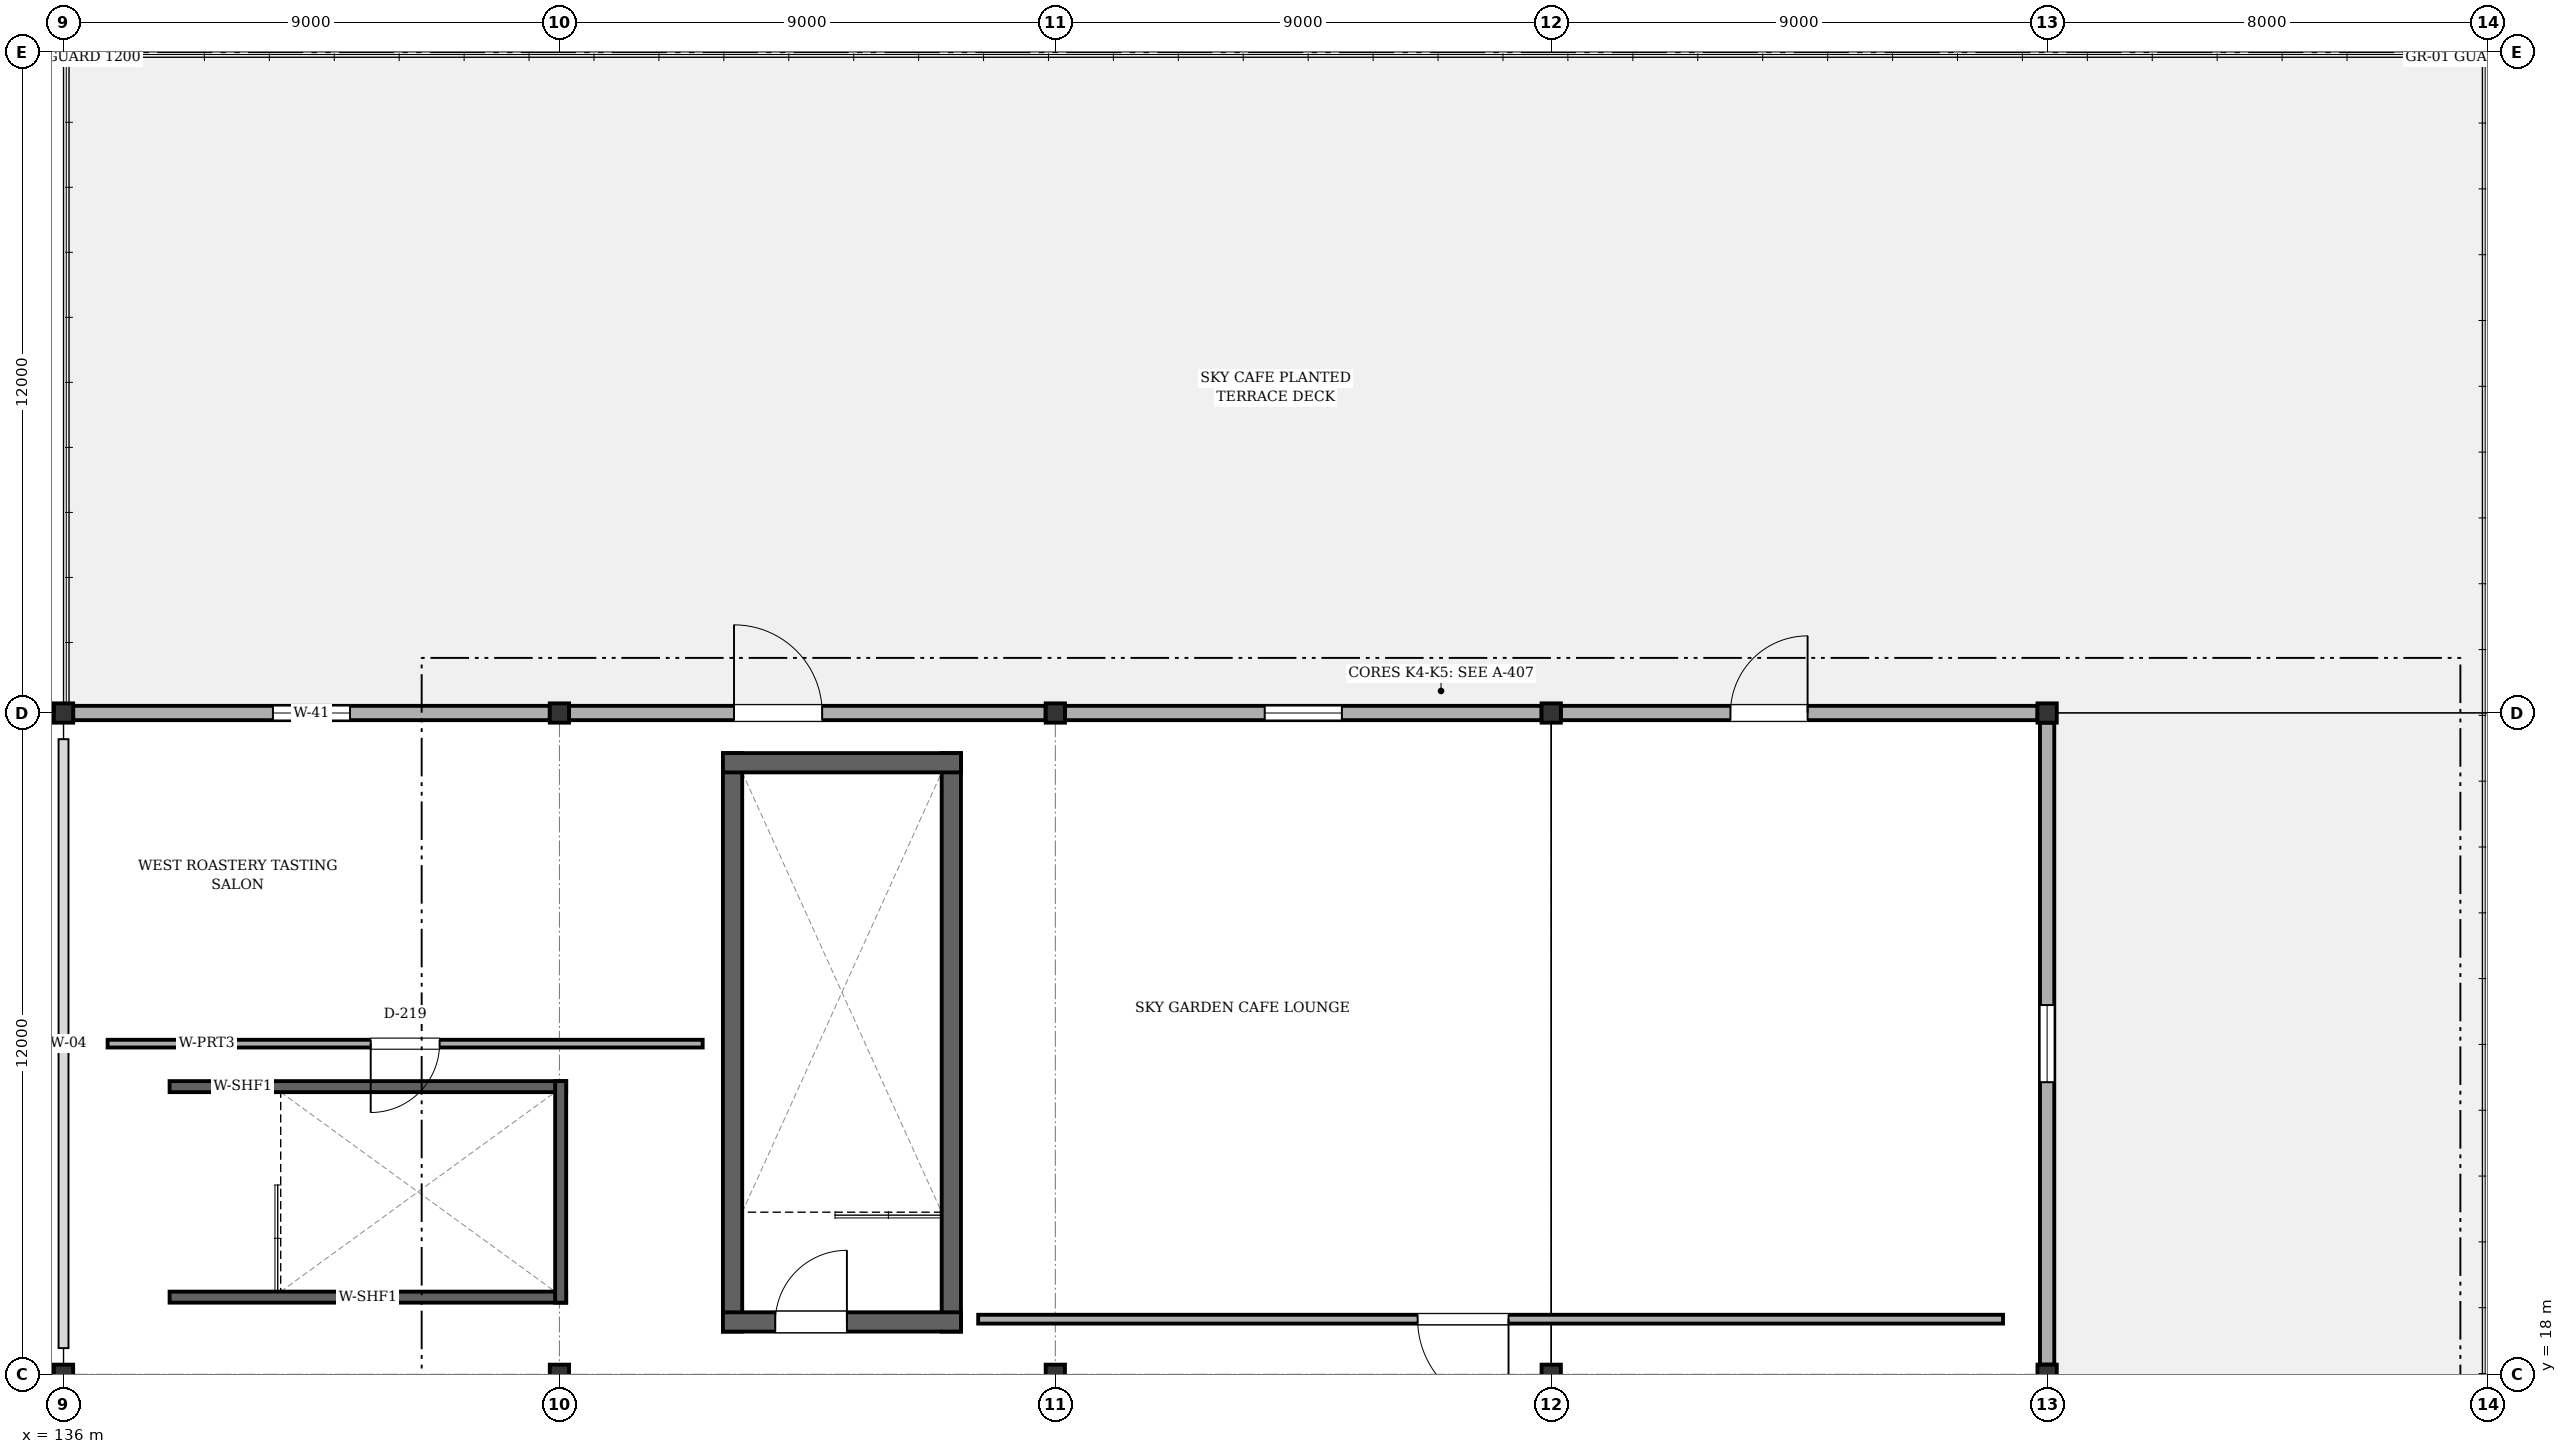
"""IFC4 building model, lengths in metres.
Left out: names, types, materials, properties, quantities, classifications, styles, units other than length and angle.
Written with IfcOpenShell. Run it as: python <this file> out.ifc"""

import sys

from ifc_helpers import new_model, si_unit, direction, frame, frame_2d, origin, origin_2d, place, context, subcontext, project, spatial, rectangle, i_section, extrude, element, fill, save


model = new_model("IFC4")
c1 = context("Model", 3, precision=1e-05, world=origin(), true_north=direction((0.0, 1.0)))
c2 = subcontext(c1, "Body", "Model", "MODEL_VIEW")
j1 = project(units=[si_unit("LENGTHUNIT", "METRE"), si_unit("PLANEANGLEUNIT", "RADIAN")], contexts=[c1])
p1 = place(None, origin())
s1 = spatial("IfcSite", under=j1, at=p1, CompositionType="ELEMENT")
p2 = place(p1, origin())
s2 = spatial("IfcBuilding", under=s1, at=p2, CompositionType="ELEMENT")
p3 = place(p2, frame((0.0, 0.0, 14.4)))
s3 = spatial("IfcBuildingStorey", under=s2, at=p3, CompositionType="ELEMENT", Elevation=14.4)
for number, where, z_axis, x_axis in (
    (1, (136.0, 18.0, 0.0), (0.0, 0.0, 1.0), (1.0, 0.0, 0.0)),
    (2, (136.0, 30.0, 0.0), (0.0, 0.0, 1.0), (1.0, 0.0, 0.0)),
    (3, (145.0, 18.0, 0.0), (0.0, 0.0, 1.0), (1.0, 0.0, 0.0)),
    (4, (145.0, 30.0, 0.0), (0.0, 0.0, 1.0), (1.0, 0.0, 0.0)),
    (5, (154.0, 18.0, 0.0), (0.0, 0.0, 1.0), (1.0, 0.0, 0.0)),
    (6, (154.0, 30.0, 0.0), (0.0, 0.0, 1.0), (1.0, 0.0, 0.0)),
    (7, (163.0, 18.0, 0.0), (0.0, 0.0, 1.0), (1.0, 0.0, 0.0)),
    (8, (163.0, 30.0, 0.0), (0.0, 0.0, 1.0), (1.0, 0.0, 0.0)),
    (9, (172.0, 18.0, 0.0), (0.0, 0.0, 1.0), (1.0, 0.0, 0.0)),
    (10, (172.0, 30.0, 0.0), (0.0, 0.0, 1.0), (1.0, 0.0, 0.0)),
):
    element("IfcColumn", number, at=place(p3, frame(where, z_axis=z_axis, x_axis=x_axis)), inside=s3, PredefinedType="COLUMN", context=c2, shape_type="SweptSolid", body=[
        extrude(i_section(OverallWidth=0.35, OverallDepth=0.35, WebThickness=0.012, FlangeThickness=0.019, FilletRadius=0.02, at=origin_2d()), origin(), (0.0, 0.0, 1.0), 3.2),
    ])
p4 = place(p3, frame((136.175, 30.0, 0.0), z_axis=(0.0, 0.0, 1.0), x_axis=(1.0, 0.0, 0.0)))
e11 = element("IfcWall", 11, at=p4, inside=s3, PredefinedType="SOLIDWALL", context=c2, shape_type="SweptSolid", body=[
    extrude(rectangle(XDim=8.65, YDim=0.26, at=frame_2d((4.325, 0.0))), origin(), (0.0, 0.0, 1.0), 2.42),
])
p5 = place(p4, frame((3.625, 0.0, 0.75)))
e12 = element("IfcOpeningElement", 12, at=p5, cuts=e11, PredefinedType="OPENING", context=c2, shape_type="SweptSolid", body=[
    extrude(rectangle(XDim=1.4, YDim=1.55, at=frame_2d((0.7, 0.775))), frame((0.0, 0.14, 0.0), z_axis=(0.0, -1.0, 0.0), x_axis=(1.0, 0.0, 0.0)), (0.0, 0.0, 1.0), 0.28),
])
p6 = place(p3, frame((145.175, 30.0, 0.0), z_axis=(0.0, 0.0, 1.0), x_axis=(1.0, 0.0, 0.0)))
e13 = element("IfcWall", 13, at=p6, inside=s3, PredefinedType="SOLIDWALL", context=c2, shape_type="SweptSolid", body=[
    extrude(rectangle(XDim=8.65, YDim=0.26, at=frame_2d((4.325, 0.0))), origin(), (0.0, 0.0, 1.0), 2.42),
])
p7 = place(p6, frame((2.994, 0.0, 0.0)))
e14 = element("IfcOpeningElement", 14, at=p7, cuts=e13, PredefinedType="OPENING", context=c2, shape_type="SweptSolid", body=[
    extrude(rectangle(XDim=1.6, YDim=2.3, at=frame_2d((0.8, 1.15))), frame((0.0, 0.14, 0.0), z_axis=(0.0, -1.0, 0.0), x_axis=(1.0, 0.0, 0.0)), (0.0, 0.0, 1.0), 0.28),
])
p8 = place(p3, frame((154.175, 30.0, 0.0), z_axis=(0.0, 0.0, 1.0), x_axis=(1.0, 0.0, 0.0)))
e15 = element("IfcWall", 15, at=p8, inside=s3, PredefinedType="SOLIDWALL", context=c2, shape_type="SweptSolid", body=[
    extrude(rectangle(XDim=8.65, YDim=0.26, at=frame_2d((4.325, 0.0))), origin(), (0.0, 0.0, 1.0), 2.42),
])
p9 = place(p8, frame((3.625, 0.0, 0.75)))
e16 = element("IfcOpeningElement", 16, at=p9, cuts=e15, PredefinedType="OPENING", context=c2, shape_type="SweptSolid", body=[
    extrude(rectangle(XDim=1.4, YDim=1.55, at=frame_2d((0.7, 0.775))), frame((0.0, 0.14, 0.0), z_axis=(0.0, -1.0, 0.0), x_axis=(1.0, 0.0, 0.0)), (0.0, 0.0, 1.0), 0.28),
])
p10 = place(p3, frame((163.175, 30.0, 0.0), z_axis=(0.0, 0.0, 1.0), x_axis=(1.0, 0.0, 0.0)))
e17 = element("IfcWall", 17, at=p10, inside=s3, PredefinedType="SOLIDWALL", context=c2, shape_type="SweptSolid", body=[
    extrude(rectangle(XDim=8.65, YDim=0.26, at=frame_2d((4.325, 0.0))), origin(), (0.0, 0.0, 1.0), 2.42),
])
p11 = place(p10, frame((3.078, 0.0, 0.0)))
e18 = element("IfcOpeningElement", 18, at=p11, cuts=e17, PredefinedType="OPENING", context=c2, shape_type="SweptSolid", body=[
    extrude(rectangle(XDim=1.4, YDim=2.25, at=frame_2d((0.7, 1.125))), frame((0.0, 0.14, 0.0), z_axis=(0.0, -1.0, 0.0), x_axis=(1.0, 0.0, 0.0)), (0.0, 0.0, 1.0), 0.28),
])
p12 = place(p3, frame((172.0, 29.825, 0.0), z_axis=(0.0, 0.0, 1.0), x_axis=(0.0, -1.0, 0.0)))
e19 = element("IfcWall", 19, at=p12, inside=s3, PredefinedType="SOLIDWALL", context=c2, shape_type="SweptSolid", body=[
    extrude(rectangle(XDim=11.65, YDim=0.26, at=frame_2d((5.825, 0.0))), origin(), (0.0, 0.0, 1.0), 2.42),
])
p13 = place(p12, frame((5.125, 0.0, 0.75)))
e20 = element("IfcOpeningElement", 20, at=p13, cuts=e19, PredefinedType="OPENING", context=c2, shape_type="SweptSolid", body=[
    extrude(rectangle(XDim=1.4, YDim=1.55, at=frame_2d((0.7, 0.775))), frame((0.0, 0.14, 0.0), z_axis=(0.0, -1.0, 0.0), x_axis=(1.0, 0.0, 0.0)), (0.0, 0.0, 1.0), 0.28),
])
for number, where, z_axis, x_axis in (
    (21, (152.113, 18.775, 0.0), (0.0, 0.0, 1.0), (0.0, 1.0, 0.0)),
    (22, (148.143, 29.272, 0.0), (0.0, 0.0, 1.0), (0.0, -1.0, 0.0)),
):
    element("IfcWall", number, at=place(p3, frame(where, z_axis=z_axis, x_axis=x_axis)), inside=s3, PredefinedType="SHEAR", context=c2, shape_type="SweptSolid", body=[
        extrude(rectangle(XDim=10.498, YDim=0.35, at=frame_2d((5.249, 0.0))), origin(), (0.0, 0.0, 1.0), 2.995),
    ])
p14 = place(p3, frame((152.288, 29.097, 0.0), z_axis=(0.0, 0.0, 1.0), x_axis=(-1.0, 0.0, 0.0)))
e23 = element("IfcWall", 23, at=p14, inside=s3, PredefinedType="SHEAR", context=c2, shape_type="SweptSolid", body=[
    extrude(rectangle(XDim=4.32, YDim=0.35, at=frame_2d((2.16, 0.0))), origin(), (0.0, 0.0, 1.0), 2.995),
])
p15 = place(p3, frame((147.968, 18.95, 0.0), z_axis=(0.0, 0.0, 1.0), x_axis=(1.0, 0.0, 0.0)))
e24 = element("IfcWall", 24, at=p15, inside=s3, PredefinedType="SHEAR", context=c2, shape_type="SweptSolid", body=[
    extrude(rectangle(XDim=4.32, YDim=0.35, at=frame_2d((2.16, 0.0))), origin(), (0.0, 0.0, 1.0), 2.995),
])
p16 = place(p15, frame((0.95, 0.0, 0.0)))
e25 = element("IfcOpeningElement", 25, at=p16, cuts=e24, PredefinedType="OPENING", context=c2, shape_type="SweptSolid", body=[
    extrude(rectangle(XDim=1.3, YDim=2.1, at=frame_2d((0.65, 1.05))), frame((0.0, 0.185, 0.0), z_axis=(0.0, -1.0, 0.0), x_axis=(1.0, 0.0, 0.0)), (0.0, 0.0, 1.0), 0.37),
])
for number, where, z_axis, x_axis in (
    (26, (137.925, 19.4, 0.0), (0.0, 0.0, 1.0), (1.0, 0.0, 0.0)),
    (27, (145.123, 23.22, 0.0), (0.0, 0.0, 1.0), (-1.0, 0.0, 0.0)),
):
    element("IfcWall", number, at=place(p3, frame(where, z_axis=z_axis, x_axis=x_axis)), inside=s3, PredefinedType="SOLIDWALL", context=c2, shape_type="SweptSolid", body=[
        extrude(rectangle(XDim=7.198, YDim=0.2, at=frame_2d((3.599, 0.0))), origin(), (0.0, 0.0, 1.0), 1.25),
    ])
p17 = place(p3, frame((145.022, 19.3, 0.0), z_axis=(0.0, 0.0, 1.0), x_axis=(0.0, 1.0, 0.0)))
e28 = element("IfcWall", 28, at=p17, inside=s3, PredefinedType="SOLIDWALL", context=c2, shape_type="SweptSolid", body=[
    extrude(rectangle(XDim=4.02, YDim=0.2, at=frame_2d((2.01, 0.0))), origin(), (0.0, 0.0, 1.0), 1.25),
])
p18 = place(p3, frame((171.2, 19.0, 0.0), z_axis=(0.0, 0.0, 1.0), x_axis=(-1.0, 0.0, 0.0)))
e29 = element("IfcWall", 29, at=p18, inside=s3, PredefinedType="PARTITIONING", context=c2, shape_type="SweptSolid", body=[
    extrude(rectangle(XDim=18.6, YDim=0.16, at=frame_2d((9.3, 0.0))), origin(), (0.0, 0.0, 1.0), 2.42),
])
p19 = place(p18, frame((8.975, 0.0, 0.0)))
e30 = element("IfcOpeningElement", 30, at=p19, cuts=e29, PredefinedType="OPENING", context=c2, shape_type="SweptSolid", body=[
    extrude(rectangle(XDim=1.65, YDim=2.1, at=frame_2d((0.825, 1.05))), frame((0.0, 0.09, 0.0), z_axis=(0.0, -1.0, 0.0), x_axis=(1.0, 0.0, 0.0)), (0.0, 0.0, 1.0), 0.18),
])
p20 = place(p3, frame((147.6, 24.0, 0.0), z_axis=(0.0, 0.0, 1.0), x_axis=(-1.0, 0.0, 0.0)))
e31 = element("IfcWall", 31, at=p20, inside=s3, PredefinedType="PARTITIONING", context=c2, shape_type="SweptSolid", body=[
    extrude(rectangle(XDim=10.8, YDim=0.14, at=frame_2d((5.4, 0.0))), origin(), (0.0, 0.0, 1.0), 2.42),
])
p21 = place(p20, frame((4.775, 0.0, 0.0)))
e32 = element("IfcOpeningElement", 32, at=p21, cuts=e31, PredefinedType="OPENING", context=c2, shape_type="SweptSolid", body=[
    extrude(rectangle(XDim=1.25, YDim=2.1, at=frame_2d((0.625, 1.05))), frame((0.0, 0.08, 0.0), z_axis=(0.0, -1.0, 0.0), x_axis=(1.0, 0.0, 0.0)), (0.0, 0.0, 1.0), 0.16),
])
p22 = place(p5, origin())
e33 = element("IfcWindow", 33, at=p22, inside=s3, PartitioningType="SINGLE_PANEL", PredefinedType="WINDOW", context=c2, shape_type="SweptSolid", body=[
    extrude(rectangle(XDim=1.4, YDim=1.55, at=frame_2d((0.7, 0.775))), frame((0.0, 0.03, 0.0), z_axis=(0.0, -1.0, 0.0), x_axis=(1.0, 0.0, 0.0)), (0.0, 0.0, 1.0), 0.06),
])
fill(e12, e33)
p23 = place(p7, origin())
e34 = element("IfcDoor", 34, at=p23, inside=s3, OperationType="SINGLE_SWING_LEFT", PredefinedType="DOOR", context=c2, shape_type="SweptSolid", body=[
    extrude(rectangle(XDim=1.6, YDim=2.3, at=frame_2d((0.8, 1.15))), frame((0.0, 0.025, 0.0), z_axis=(0.0, -1.0, 0.0), x_axis=(1.0, 0.0, 0.0)), (0.0, 0.0, 1.0), 0.05),
])
fill(e14, e34)
p24 = place(p9, origin())
e35 = element("IfcWindow", 35, at=p24, inside=s3, PartitioningType="SINGLE_PANEL", PredefinedType="WINDOW", context=c2, shape_type="SweptSolid", body=[
    extrude(rectangle(XDim=1.4, YDim=1.55, at=frame_2d((0.7, 0.775))), frame((0.0, 0.03, 0.0), z_axis=(0.0, -1.0, 0.0), x_axis=(1.0, 0.0, 0.0)), (0.0, 0.0, 1.0), 0.06),
])
fill(e16, e35)
p25 = place(p11, origin())
e36 = element("IfcDoor", 36, at=p25, inside=s3, OperationType="SINGLE_SWING_RIGHT", PredefinedType="DOOR", context=c2, shape_type="SweptSolid", body=[
    extrude(rectangle(XDim=1.4, YDim=2.25, at=frame_2d((0.7, 1.125))), frame((0.0, 0.025, 0.0), z_axis=(0.0, -1.0, 0.0), x_axis=(1.0, 0.0, 0.0)), (0.0, 0.0, 1.0), 0.05),
])
fill(e18, e36)
p26 = place(p13, origin())
e37 = element("IfcWindow", 37, at=p26, inside=s3, PartitioningType="SINGLE_PANEL", PredefinedType="WINDOW", context=c2, shape_type="SweptSolid", body=[
    extrude(rectangle(XDim=1.4, YDim=1.55, at=frame_2d((0.7, 0.775))), frame((0.0, 0.03, 0.0), z_axis=(0.0, -1.0, 0.0), x_axis=(1.0, 0.0, 0.0)), (0.0, 0.0, 1.0), 0.06),
])
fill(e20, e37)
p27 = place(p16, origin())
e38 = element("IfcDoor", 38, at=p27, inside=s3, OperationType="SINGLE_SWING_RIGHT", PredefinedType="DOOR", context=c2, shape_type="SweptSolid", body=[
    extrude(rectangle(XDim=1.3, YDim=2.1, at=frame_2d((0.65, 1.05))), frame((0.0, 0.025, 0.0), z_axis=(0.0, -1.0, 0.0), x_axis=(1.0, 0.0, 0.0)), (0.0, 0.0, 1.0), 0.05),
])
fill(e25, e38)
p28 = place(p19, origin())
e39 = element("IfcDoor", 39, at=p28, inside=s3, OperationType="SINGLE_SWING_LEFT", PredefinedType="DOOR", context=c2, shape_type="SweptSolid", body=[
    extrude(rectangle(XDim=1.65, YDim=2.1, at=frame_2d((0.825, 1.05))), frame((0.0, 0.025, 0.0), z_axis=(0.0, -1.0, 0.0), x_axis=(1.0, 0.0, 0.0)), (0.0, 0.0, 1.0), 0.05),
])
fill(e30, e39)
p29 = place(p21, origin())
e40 = element("IfcDoor", 40, at=p29, inside=s3, OperationType="SINGLE_SWING_RIGHT", PredefinedType="DOOR", context=c2, shape_type="SweptSolid", body=[
    extrude(rectangle(XDim=1.25, YDim=2.1, at=frame_2d((0.625, 1.05))), frame((0.0, 0.025, 0.0), z_axis=(0.0, -1.0, 0.0), x_axis=(1.0, 0.0, 0.0)), (0.0, 0.0, 1.0), 0.05),
])
fill(e32, e40)
save(model, sys.argv[1])
